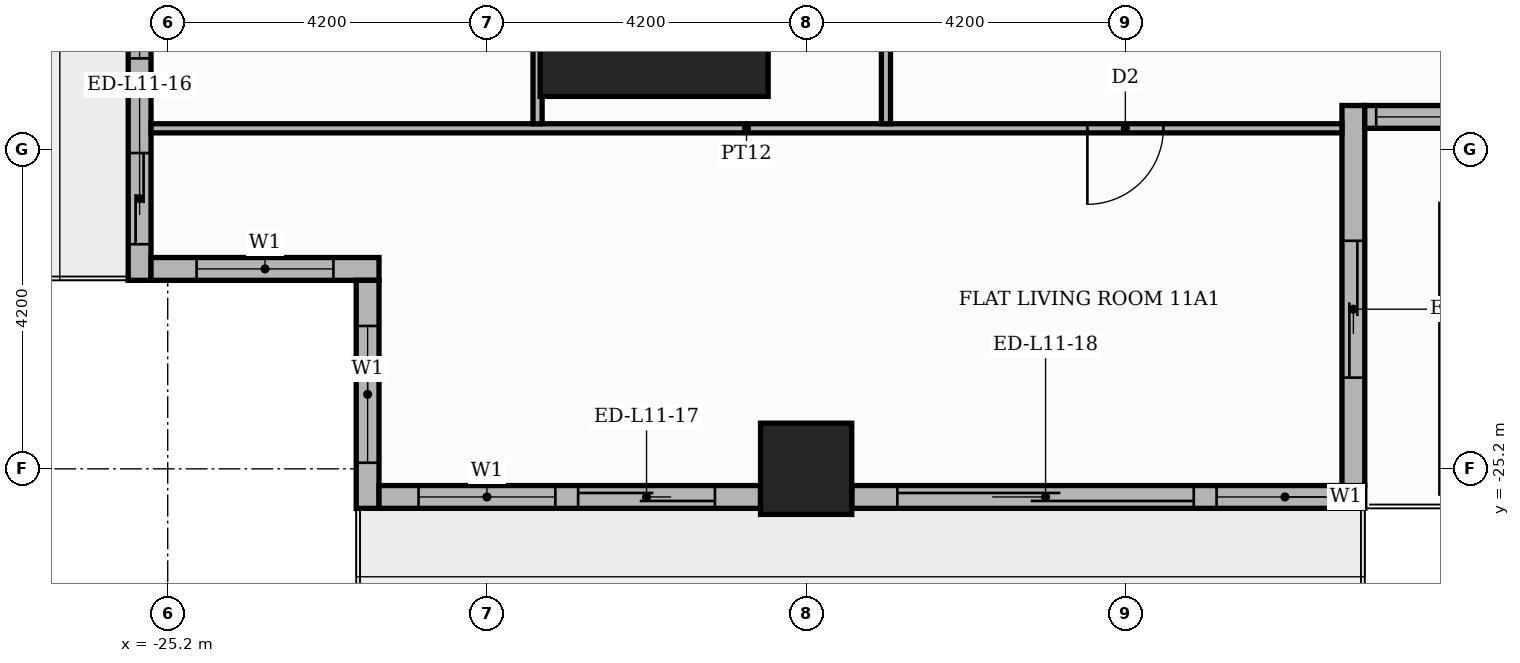
"""IFC4 building model, lengths in metres.
Left out: names, types, materials, properties, quantities, classifications, styles, units other than length and angle.
Written with IfcOpenShell. Run it as: python <this file> out.ifc"""

import sys

from ifc_helpers import new_model, si_unit, direction, frame, frame_2d, origin, origin_2d, place, context, subcontext, project, spatial, rectangle, extrude, element, fill, save


model = new_model("IFC4")
c1 = context("Model", 3, precision=1e-05, world=origin(), true_north=direction((0.0, 1.0)))
c2 = subcontext(c1, "Body", "Model", "MODEL_VIEW")
j1 = project(units=[si_unit("LENGTHUNIT", "METRE"), si_unit("PLANEANGLEUNIT", "RADIAN")], contexts=[c1])
p1 = place(None, origin())
s1 = spatial("IfcSite", under=j1, at=p1, CompositionType="ELEMENT")
p2 = place(p1, origin())
s2 = spatial("IfcBuilding", under=s1, at=p2, CompositionType="ELEMENT")
p3 = place(p2, frame((0.0, 0.0, 50.4)))
s3 = spatial("IfcBuildingStorey", under=s2, at=p3, CompositionType="ELEMENT", Elevation=50.4)
p4 = place(p3, frame((-18.8, -18.8, 0.0), z_axis=(0.0, 0.0, 1.0), x_axis=(1.0, 0.0, 0.0)))
e1 = element("IfcColumn", 1, at=p4, inside=s3, PredefinedType="COLUMN", context=c2, shape_type="SweptSolid", body=[
    extrude(rectangle(XDim=3.0, YDim=3.0, at=origin_2d()), origin(), (0.0, 0.0, 1.0), 3.9),
])
p5 = place(p3, frame((-16.8, -25.2, 0.0), z_axis=(0.0, 0.0, 1.0), x_axis=(1.0, 0.0, 0.0)))
e2 = element("IfcColumn", 2, at=p5, inside=s3, PredefinedType="COLUMN", context=c2, shape_type="SweptSolid", body=[
    extrude(rectangle(XDim=1.2, YDim=1.2, at=origin_2d()), origin(), (0.0, 0.0, 1.0), 3.9),
])
p6 = place(p3, frame((-25.57, -17.4, 0.0), z_axis=(0.0, 0.0, 1.0), x_axis=(0.0, -1.0, 0.0)))
e3 = element("IfcWall", 3, at=p6, inside=s3, PredefinedType="STANDARD", context=c2, shape_type="SweptSolid", body=[
    extrude(rectangle(XDim=5.32, YDim=0.3, at=frame_2d((2.66, 0.0))), origin(), (0.0, 0.0, 1.0), 3.48),
])
p7 = place(p6, frame((0.6, 0.0, 0.9)))
e4 = element("IfcOpeningElement", 4, at=p7, cuts=e3, PredefinedType="OPENING", context=c2, shape_type="SweptSolid", body=[
    extrude(rectangle(XDim=1.8, YDim=2.1, at=frame_2d((0.9, 1.05))), frame((0.0, 0.16, 0.0), z_axis=(0.0, -1.0, 0.0), x_axis=(1.0, 0.0, 0.0)), (0.0, 0.0, 1.0), 0.32),
])
p8 = place(p6, frame((3.645, 0.0, 0.0)))
e5 = element("IfcOpeningElement", 5, at=p8, cuts=e3, PredefinedType="OPENING", context=c2, shape_type="SweptSolid", body=[
    extrude(rectangle(XDim=1.2, YDim=2.4, at=frame_2d((0.6, 1.2))), frame((0.0, 0.16, 0.0), z_axis=(0.0, -1.0, 0.0), x_axis=(1.0, 0.0, 0.0)), (0.0, 0.0, 1.0), 0.32),
])
p9 = place(p3, frame((-25.42, -22.57, 0.0), z_axis=(0.0, 0.0, 1.0), x_axis=(1.0, 0.0, 0.0)))
e6 = element("IfcWall", 6, at=p9, inside=s3, PredefinedType="STANDARD", context=c2, shape_type="SweptSolid", body=[
    extrude(rectangle(XDim=3.0, YDim=0.3, at=frame_2d((1.5, 0.0))), origin(), (0.0, 0.0, 1.0), 3.48),
])
p10 = place(p9, frame((0.6, 0.0, 0.9)))
e7 = element("IfcOpeningElement", 7, at=p10, cuts=e6, PredefinedType="OPENING", context=c2, shape_type="SweptSolid", body=[
    extrude(rectangle(XDim=1.8, YDim=2.1, at=frame_2d((0.9, 1.05))), frame((0.0, 0.16, 0.0), z_axis=(0.0, -1.0, 0.0), x_axis=(1.0, 0.0, 0.0)), (0.0, 0.0, 1.0), 0.32),
])
p11 = place(p3, frame((-22.57, -22.72, 0.0), z_axis=(0.0, 0.0, 1.0), x_axis=(0.0, -1.0, 0.0)))
e8 = element("IfcWall", 8, at=p11, inside=s3, PredefinedType="STANDARD", context=c2, shape_type="SweptSolid", body=[
    extrude(rectangle(XDim=3.0, YDim=0.3, at=frame_2d((1.5, 0.0))), origin(), (0.0, 0.0, 1.0), 3.48),
])
p12 = place(p11, frame((0.6, 0.0, 0.9)))
e9 = element("IfcOpeningElement", 9, at=p12, cuts=e8, PredefinedType="OPENING", context=c2, shape_type="SweptSolid", body=[
    extrude(rectangle(XDim=1.8, YDim=2.1, at=frame_2d((0.9, 1.05))), frame((0.0, 0.16, 0.0), z_axis=(0.0, -1.0, 0.0), x_axis=(1.0, 0.0, 0.0)), (0.0, 0.0, 1.0), 0.32),
])
p13 = place(p3, frame((-22.42, -25.57, 0.0), z_axis=(0.0, 0.0, 1.0), x_axis=(1.0, 0.0, 0.0)))
e10 = element("IfcWall", 10, at=p13, inside=s3, PredefinedType="STANDARD", context=c2, shape_type="SweptSolid", body=[
    extrude(rectangle(XDim=5.02, YDim=0.3, at=frame_2d((2.51, 0.0))), origin(), (0.0, 0.0, 1.0), 3.48),
])
p14 = place(p13, frame((0.52, 0.0, 0.9)))
e11 = element("IfcOpeningElement", 11, at=p14, cuts=e10, PredefinedType="OPENING", context=c2, shape_type="SweptSolid", body=[
    extrude(rectangle(XDim=1.8, YDim=2.1, at=frame_2d((0.9, 1.05))), frame((0.0, 0.16, 0.0), z_axis=(0.0, -1.0, 0.0), x_axis=(1.0, 0.0, 0.0)), (0.0, 0.0, 1.0), 0.32),
])
p15 = place(p13, frame((2.62, 0.0, 0.0)))
e12 = element("IfcOpeningElement", 12, at=p15, cuts=e10, PredefinedType="OPENING", context=c2, shape_type="SweptSolid", body=[
    extrude(rectangle(XDim=1.8, YDim=2.4, at=frame_2d((0.9, 1.2))), frame((0.0, 0.16, 0.0), z_axis=(0.0, -1.0, 0.0), x_axis=(1.0, 0.0, 0.0)), (0.0, 0.0, 1.0), 0.32),
])
p16 = place(p3, frame((-16.2, -25.57, 0.0), z_axis=(0.0, 0.0, 1.0), x_axis=(1.0, 0.0, 0.0)))
e13 = element("IfcWall", 13, at=p16, inside=s3, PredefinedType="STANDARD", context=c2, shape_type="SweptSolid", body=[
    extrude(rectangle(XDim=6.75, YDim=0.3, at=frame_2d((3.375, 0.0))), origin(), (0.0, 0.0, 1.0), 3.48),
])
p17 = place(p16, frame((0.6, 0.0, 0.0)))
e14 = element("IfcOpeningElement", 14, at=p17, cuts=e13, PredefinedType="OPENING", context=c2, shape_type="SweptSolid", body=[
    extrude(rectangle(XDim=3.9, YDim=2.4, at=frame_2d((1.95, 1.2))), frame((0.0, 0.16, 0.0), z_axis=(0.0, -1.0, 0.0), x_axis=(1.0, 0.0, 0.0)), (0.0, 0.0, 1.0), 0.32),
])
p18 = place(p16, frame((4.8, 0.0, 0.9)))
e15 = element("IfcOpeningElement", 15, at=p18, cuts=e13, PredefinedType="OPENING", context=c2, shape_type="SweptSolid", body=[
    extrude(rectangle(XDim=1.8, YDim=2.1, at=frame_2d((0.9, 1.05))), frame((0.0, 0.16, 0.0), z_axis=(0.0, -1.0, 0.0), x_axis=(1.0, 0.0, 0.0)), (0.0, 0.0, 1.0), 0.32),
])
p19 = place(p3, frame((-9.6, -25.42, 0.0), z_axis=(0.0, 0.0, 1.0), x_axis=(0.0, 1.0, 0.0)))
e16 = element("IfcWall", 16, at=p19, inside=s3, PredefinedType="STANDARD", context=c2, shape_type="SweptSolid", body=[
    extrude(rectangle(XDim=5.0, YDim=0.3, at=frame_2d((2.5, 0.0))), origin(), (0.0, 0.0, 1.0), 3.48),
])
p20 = place(p19, frame((1.42, 0.0, 0.0)))
e17 = element("IfcOpeningElement", 17, at=p20, cuts=e16, PredefinedType="OPENING", context=c2, shape_type="SweptSolid", body=[
    extrude(rectangle(XDim=1.8, YDim=2.4, at=frame_2d((0.9, 1.2))), frame((0.0, 0.16, 0.0), z_axis=(0.0, -1.0, 0.0), x_axis=(1.0, 0.0, 0.0)), (0.0, 0.0, 1.0), 0.32),
])
p21 = place(p3, frame((-9.45, -20.57, 0.0), z_axis=(0.0, 0.0, 1.0), x_axis=(1.0, 0.0, 0.0)))
e18 = element("IfcWall", 18, at=p21, inside=s3, PredefinedType="STANDARD", context=c2, shape_type="SweptSolid", body=[
    extrude(rectangle(XDim=19.2, YDim=0.3, at=frame_2d((9.6, 0.0))), origin(), (0.0, 0.0, 1.0), 3.48),
])
p22 = place(p21, frame((0.15, 0.0, 0.9)))
e19 = element("IfcOpeningElement", 19, at=p22, cuts=e18, PredefinedType="OPENING", context=c2, shape_type="SweptSolid", body=[
    extrude(rectangle(XDim=3.9, YDim=2.1, at=frame_2d((1.95, 1.05))), frame((0.0, 0.16, 0.0), z_axis=(0.0, -1.0, 0.0), x_axis=(1.0, 0.0, 0.0)), (0.0, 0.0, 1.0), 0.32),
])
p23 = place(p21, frame((4.35, 0.0, 0.9)))
e20 = element("IfcOpeningElement", 20, at=p23, cuts=e18, PredefinedType="OPENING", context=c2, shape_type="SweptSolid", body=[
    extrude(rectangle(XDim=6.0, YDim=2.1, at=frame_2d((3.0, 1.05))), frame((0.0, 0.16, 0.0), z_axis=(0.0, -1.0, 0.0), x_axis=(1.0, 0.0, 0.0)), (0.0, 0.0, 1.0), 0.32),
])
p24 = place(p21, frame((10.65, 0.0, 0.9)))
e21 = element("IfcOpeningElement", 21, at=p24, cuts=e18, PredefinedType="OPENING", context=c2, shape_type="SweptSolid", body=[
    extrude(rectangle(XDim=6.0, YDim=2.1, at=frame_2d((3.0, 1.05))), frame((0.0, 0.16, 0.0), z_axis=(0.0, -1.0, 0.0), x_axis=(1.0, 0.0, 0.0)), (0.0, 0.0, 1.0), 0.32),
])
p25 = place(p21, frame((16.95, 0.0, 0.9)))
e22 = element("IfcOpeningElement", 22, at=p25, cuts=e18, PredefinedType="OPENING", context=c2, shape_type="SweptSolid", body=[
    extrude(rectangle(XDim=1.8, YDim=2.1, at=frame_2d((0.9, 1.05))), frame((0.0, 0.16, 0.0), z_axis=(0.0, -1.0, 0.0), x_axis=(1.0, 0.0, 0.0)), (0.0, 0.0, 1.0), 0.32),
])
p26 = place(p3, frame((-25.42, -20.72, 0.0), z_axis=(0.0, 0.0, 1.0), x_axis=(1.0, 0.0, 0.0)))
e23 = element("IfcWall", 23, at=p26, inside=s3, PredefinedType="PARTITIONING", context=c2, shape_type="SweptSolid", body=[
    extrude(rectangle(XDim=15.67, YDim=0.12, at=frame_2d((7.835, 0.0))), origin(), (0.0, 0.0, 1.0), 3.48),
])
p27 = place(p26, frame((12.32, 0.0, 0.0)))
e24 = element("IfcOpeningElement", 24, at=p27, cuts=e23, PredefinedType="OPENING", context=c2, shape_type="SweptSolid", body=[
    extrude(rectangle(XDim=1.0, YDim=2.1, at=frame_2d((0.5, 1.05))), frame((0.0, 0.07, 0.0), z_axis=(0.0, -1.0, 0.0), x_axis=(1.0, 0.0, 0.0)), (0.0, 0.0, 1.0), 0.14),
])
p28 = place(p3, frame((-20.334, -20.66, 0.0), z_axis=(0.0, 0.0, 1.0), x_axis=(0.0, 1.0, 0.0)))
e25 = element("IfcWall", 25, at=p28, inside=s3, PredefinedType="PARTITIONING", context=c2, shape_type="SweptSolid", body=[
    extrude(rectangle(XDim=6.91, YDim=0.12, at=frame_2d((3.455, 0.0))), origin(), (0.0, 0.0, 1.0), 3.48),
])
p29 = place(p28, frame((4.792, 0.0, 0.0)))
e26 = element("IfcOpeningElement", 26, at=p29, cuts=e25, PredefinedType="OPENING", context=c2, shape_type="SweptSolid", body=[
    extrude(rectangle(XDim=0.9, YDim=2.1, at=frame_2d((0.45, 1.05))), frame((0.0, 0.07, 0.0), z_axis=(0.0, -1.0, 0.0), x_axis=(1.0, 0.0, 0.0)), (0.0, 0.0, 1.0), 0.14),
])
p30 = place(p3, frame((-15.75, -20.66, 0.0), z_axis=(0.0, 0.0, 1.0), x_axis=(0.0, 1.0, 0.0)))
e27 = element("IfcWall", 27, at=p30, inside=s3, PredefinedType="PARTITIONING", context=c2, shape_type="SweptSolid", body=[
    extrude(rectangle(XDim=6.91, YDim=0.12, at=frame_2d((3.455, 0.0))), origin(), (0.0, 0.0, 1.0), 3.48),
])
p31 = place(p30, frame((2.975, 0.0, 0.0)))
e28 = element("IfcOpeningElement", 28, at=p31, cuts=e27, PredefinedType="OPENING", context=c2, shape_type="SweptSolid", body=[
    extrude(rectangle(XDim=1.0, YDim=2.1, at=frame_2d((0.5, 1.05))), frame((0.0, 0.07, 0.0), z_axis=(0.0, -1.0, 0.0), x_axis=(1.0, 0.0, 0.0)), (0.0, 0.0, 1.0), 0.14),
])
p32 = place(p7, origin())
e29 = element("IfcWindow", 29, at=p32, inside=s3, PartitioningType="SINGLE_PANEL", PredefinedType="WINDOW", context=c2, shape_type="SweptSolid", body=[
    extrude(rectangle(XDim=1.8, YDim=2.1, at=frame_2d((0.9, 1.05))), frame((0.0, 0.03, 0.0), z_axis=(0.0, -1.0, 0.0), x_axis=(1.0, 0.0, 0.0)), (0.0, 0.0, 1.0), 0.06),
])
fill(e4, e29)
p33 = place(p8, origin())
e30 = element("IfcDoor", 30, at=p33, inside=s3, OperationType="SLIDING_TO_RIGHT", PredefinedType="DOOR", context=c2, shape_type="SweptSolid", body=[
    extrude(rectangle(XDim=1.2, YDim=2.4, at=frame_2d((0.6, 1.2))), frame((0.0, 0.025, 0.0), z_axis=(0.0, -1.0, 0.0), x_axis=(1.0, 0.0, 0.0)), (0.0, 0.0, 1.0), 0.05),
])
fill(e5, e30)
p34 = place(p10, origin())
e31 = element("IfcWindow", 31, at=p34, inside=s3, PartitioningType="SINGLE_PANEL", PredefinedType="WINDOW", context=c2, shape_type="SweptSolid", body=[
    extrude(rectangle(XDim=1.8, YDim=2.1, at=frame_2d((0.9, 1.05))), frame((0.0, 0.03, 0.0), z_axis=(0.0, -1.0, 0.0), x_axis=(1.0, 0.0, 0.0)), (0.0, 0.0, 1.0), 0.06),
])
fill(e7, e31)
p35 = place(p12, origin())
e32 = element("IfcWindow", 32, at=p35, inside=s3, PartitioningType="SINGLE_PANEL", PredefinedType="WINDOW", context=c2, shape_type="SweptSolid", body=[
    extrude(rectangle(XDim=1.8, YDim=2.1, at=frame_2d((0.9, 1.05))), frame((0.0, 0.03, 0.0), z_axis=(0.0, -1.0, 0.0), x_axis=(1.0, 0.0, 0.0)), (0.0, 0.0, 1.0), 0.06),
])
fill(e9, e32)
p36 = place(p14, origin())
e33 = element("IfcWindow", 33, at=p36, inside=s3, PartitioningType="SINGLE_PANEL", PredefinedType="WINDOW", context=c2, shape_type="SweptSolid", body=[
    extrude(rectangle(XDim=1.8, YDim=2.1, at=frame_2d((0.9, 1.05))), frame((0.0, 0.03, 0.0), z_axis=(0.0, -1.0, 0.0), x_axis=(1.0, 0.0, 0.0)), (0.0, 0.0, 1.0), 0.06),
])
fill(e11, e33)
p37 = place(p15, origin())
e34 = element("IfcDoor", 34, at=p37, inside=s3, OperationType="SLIDING_TO_RIGHT", PredefinedType="DOOR", context=c2, shape_type="SweptSolid", body=[
    extrude(rectangle(XDim=1.8, YDim=2.4, at=frame_2d((0.9, 1.2))), frame((0.0, 0.025, 0.0), z_axis=(0.0, -1.0, 0.0), x_axis=(1.0, 0.0, 0.0)), (0.0, 0.0, 1.0), 0.05),
])
fill(e12, e34)
p38 = place(p17, origin())
e35 = element("IfcDoor", 35, at=p38, inside=s3, OperationType="SLIDING_TO_LEFT", PredefinedType="DOOR", context=c2, shape_type="SweptSolid", body=[
    extrude(rectangle(XDim=3.9, YDim=2.4, at=frame_2d((1.95, 1.2))), frame((0.0, 0.025, 0.0), z_axis=(0.0, -1.0, 0.0), x_axis=(1.0, 0.0, 0.0)), (0.0, 0.0, 1.0), 0.05),
])
fill(e14, e35)
p39 = place(p18, origin())
e36 = element("IfcWindow", 36, at=p39, inside=s3, PartitioningType="SINGLE_PANEL", PredefinedType="WINDOW", context=c2, shape_type="SweptSolid", body=[
    extrude(rectangle(XDim=1.8, YDim=2.1, at=frame_2d((0.9, 1.05))), frame((0.0, 0.03, 0.0), z_axis=(0.0, -1.0, 0.0), x_axis=(1.0, 0.0, 0.0)), (0.0, 0.0, 1.0), 0.06),
])
fill(e15, e36)
p40 = place(p20, origin())
e37 = element("IfcDoor", 37, at=p40, inside=s3, OperationType="SLIDING_TO_LEFT", PredefinedType="DOOR", context=c2, shape_type="SweptSolid", body=[
    extrude(rectangle(XDim=1.8, YDim=2.4, at=frame_2d((0.9, 1.2))), frame((0.0, 0.025, 0.0), z_axis=(0.0, -1.0, 0.0), x_axis=(1.0, 0.0, 0.0)), (0.0, 0.0, 1.0), 0.05),
])
fill(e17, e37)
p41 = place(p22, origin())
e38 = element("IfcWindow", 38, at=p41, inside=s3, PartitioningType="SINGLE_PANEL", PredefinedType="WINDOW", context=c2, shape_type="SweptSolid", body=[
    extrude(rectangle(XDim=3.9, YDim=2.1, at=frame_2d((1.95, 1.05))), frame((0.0, 0.03, 0.0), z_axis=(0.0, -1.0, 0.0), x_axis=(1.0, 0.0, 0.0)), (0.0, 0.0, 1.0), 0.06),
])
fill(e19, e38)
p42 = place(p27, frame((1.0, 0.0, 0.0), z_axis=(0.0, 0.0, 1.0), x_axis=(-1.0, 0.0, 0.0)))
e39 = element("IfcDoor", 39, at=p42, inside=s3, OperationType="SINGLE_SWING_LEFT", PredefinedType="DOOR", context=c2, shape_type="SweptSolid", body=[
    extrude(rectangle(XDim=1.0, YDim=2.1, at=frame_2d((0.5, 1.05))), frame((0.0, 0.025, 0.0), z_axis=(0.0, -1.0, 0.0), x_axis=(1.0, 0.0, 0.0)), (0.0, 0.0, 1.0), 0.05),
])
fill(e24, e39)
save(model, sys.argv[1])
